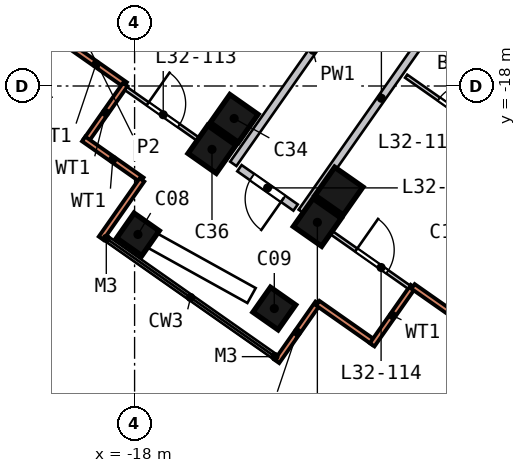
"""IFC4 building model, lengths in metres.
Left out: names, types, materials, properties, quantities, classifications, styles, units other than length and angle.
Written with IfcOpenShell. Run it as: python <this file> out.ifc"""

import sys

from ifc_helpers import new_model, si_unit, direction, frame, frame_2d, origin, origin_2d, place, context, subcontext, project, spatial, rectangle, extrude, element, fill, save


model = new_model("IFC4")
c1 = context("Model", 3, precision=1e-05, world=origin(), true_north=direction((0.0, 1.0)))
c2 = subcontext(c1, "Body", "Model", "MODEL_VIEW")
j1 = project(units=[si_unit("LENGTHUNIT", "METRE"), si_unit("PLANEANGLEUNIT", "RADIAN")], contexts=[c1])
p1 = place(None, origin())
s1 = spatial("IfcSite", under=j1, at=p1, CompositionType="ELEMENT")
p2 = place(p1, origin())
s2 = spatial("IfcBuilding", under=s1, at=p2, CompositionType="ELEMENT")
p3 = place(p2, frame((0.0, 0.0, 136.5)))
s3 = spatial("IfcBuildingStorey", under=s2, at=p3, CompositionType="ELEMENT", Elevation=136.5)
p4 = place(p3, frame((-18.038, -21.804, 0.0), z_axis=(0.104205823, -0.084714632, 0.990941258), x_axis=(0.812221673, -0.567761849, -0.133949377)))
e1 = element("IfcColumn", 1, at=p4, inside=s3, PredefinedType="COLUMN", context=c2, shape_type="SweptSolid", body=[
    extrude(rectangle(XDim=0.8, YDim=0.8, at=origin_2d()), origin(), (0.0, 0.0, 1.0), 3.219),
])
p5 = place(p3, frame((-14.461, -23.775, 0.0), z_axis=(0.113416824, -0.067670774, 0.991240279), x_axis=(0.810958398, -0.570087188, -0.131708295)))
e2 = element("IfcColumn", 2, at=p5, inside=s3, PredefinedType="COLUMN", context=c2, shape_type="SweptSolid", body=[
    extrude(rectangle(XDim=0.8, YDim=0.8, at=origin_2d()), origin(), (0.0, 0.0, 1.0), 3.218),
])
for number, where, z_axis, x_axis in (
    (3, (-15.489, -18.767, 0.0), (0.09, -0.073, 0.993), (-0.575, -0.818, -0.008)),
    (4, (-12.741, -20.694, 0.0), (0.099, -0.06, 0.993), (-0.573, -0.819, 0.008)),
):
    element("IfcColumn", number, at=place(p3, frame(where, z_axis=z_axis, x_axis=x_axis)), inside=s3, PredefinedType="COLUMN", context=c2, shape_type="SweptSolid", body=[
        extrude(rectangle(XDim=0.9, YDim=0.9, at=origin_2d()), origin(), (0.0, 0.0, 1.0), 3.211),
    ])
p6 = place(p3, frame((-16.077, -19.576, 0.0), z_axis=(0.09368082, -0.075598067, 0.992727977), x_axis=(-0.574764351, -0.818279134, -0.008074644)))
e5 = element("IfcColumn", 5, at=p6, inside=s3, PredefinedType="COLUMN", context=c2, shape_type="SweptSolid", body=[
    extrude(rectangle(XDim=0.9, YDim=0.9, at=origin_2d()), origin(), (0.0, 0.0, 1.0), 3.213),
])
p7 = place(p3, frame((-13.315, -21.513, 0.0), z_axis=(0.102724191, -0.062455093, 0.99274725), x_axis=(-0.573707052, -0.819023064, 0.007838281)))
e6 = element("IfcColumn", 6, at=p7, inside=s3, PredefinedType="COLUMN", context=c2, shape_type="SweptSolid", body=[
    extrude(rectangle(XDim=0.9, YDim=0.9, at=origin_2d()), origin(), (0.0, 0.0, 1.0), 3.213),
])
p8 = place(p3, frame((-19.781, -16.887, 0.0), z_axis=(0.0, 0.0, 1.0), x_axis=(0.818778979, -0.574108861, 0.0)))
e7 = element("IfcWall", 7, at=p8, inside=s3, PredefinedType="SOLIDWALL", context=c2, shape_type="SweptSolid", body=[
    extrude(rectangle(XDim=1.875, YDim=0.15, at=frame_2d((0.938, 0.0))), origin(), (0.0, 0.0, 1.0), 3.19),
])
p9 = place(p3, frame((-18.246, -17.963, 0.0), z_axis=(0.0, 0.0, 1.0), x_axis=(-0.574108441, -0.818779273, 0.0)))
e8 = element("IfcWall", 8, at=p9, inside=s3, PredefinedType="SOLIDWALL", context=c2, shape_type="SweptSolid", body=[
    extrude(rectangle(XDim=1.8, YDim=0.15, at=frame_2d((0.9, 0.0))), origin(), (0.0, 0.0, 1.0), 3.19),
])
for number, where, z_axis, x_axis in (
    (9, (-19.341, -19.394, 0.0), (0.0, 0.0, 1.0), (0.819, -0.574, 0.0)),
    (10, (-17.805, -20.471, 0.0), (0.0, 0.0, 1.0), (-0.574, -0.819, 0.0)),
    (11, (-14.256, -25.25, 0.0), (0.0, 0.0, 1.0), (0.574, 0.819, 0.0)),
):
    element("IfcWall", number, at=place(p3, frame(where, z_axis=z_axis, x_axis=x_axis)), inside=s3, PredefinedType="SOLIDWALL", context=c2, shape_type="SweptSolid", body=[
        extrude(rectangle(XDim=1.875, YDim=0.15, at=frame_2d((0.938, 0.0))), origin(), (0.0, 0.0, 1.0), 3.19),
    ])
p10 = place(p3, frame((-13.179, -23.715, 0.0), z_axis=(0.0, 0.0, 1.0), x_axis=(0.818734563, -0.574172201, 0.0)))
e12 = element("IfcWall", 12, at=p10, inside=s3, PredefinedType="SOLIDWALL", context=c2, shape_type="SweptSolid", body=[
    extrude(rectangle(XDim=1.8, YDim=0.15, at=frame_2d((0.9, 0.0))), origin(), (0.0, 0.0, 1.0), 3.19),
])
for number, where, z_axis, x_axis in (
    (13, (-11.749, -24.81, 0.0), (0.0, 0.0, 1.0), (0.574, 0.819, 0.0)),
    (14, (-10.672, -23.274, 0.0), (0.0, 0.0, 1.0), (0.819, -0.574, 0.0)),
):
    element("IfcWall", number, at=place(p3, frame(where, z_axis=z_axis, x_axis=x_axis)), inside=s3, PredefinedType="SOLIDWALL", context=c2, shape_type="SweptSolid", body=[
        extrude(rectangle(XDim=1.875, YDim=0.15, at=frame_2d((0.938, 0.0))), origin(), (0.0, 0.0, 1.0), 3.19),
    ])
p11 = place(p3, frame((-21.803, -17.042, 0.0), z_axis=(0.0, 0.0, 1.0), x_axis=(0.906596382, 0.421998815, 0.0)))
e15 = element("IfcWall", 15, at=p11, inside=s3, PredefinedType="SOLIDWALL", context=c2, shape_type="SweptSolid", body=[
    extrude(rectangle(XDim=2.699, YDim=0.5, at=frame_2d((1.35, 0.0))), origin(), (0.0, 0.0, 1.0), 0.7),
])
p12 = place(p3, frame((-13.763, -21.198, 0.0), z_axis=(0.0, 0.0, 1.0), x_axis=(-0.81872299, 0.574188702, 0.0)))
e16 = element("IfcWall", 16, at=p12, inside=s3, PredefinedType="SOLIDWALL", context=c2, shape_type="SweptSolid", body=[
    extrude(rectangle(XDim=1.804, YDim=0.2, at=frame_2d((0.902, 0.0))), origin(), (0.0, 0.0, 1.0), 3.19),
])
p13 = place(p12, frame((0.4, 0.0, 0.0)))
e17 = element("IfcOpeningElement", 17, at=p13, cuts=e16, PredefinedType="OPENING", context=c2, shape_type="SweptSolid", body=[
    extrude(rectangle(XDim=1.0, YDim=2.1, at=frame_2d((0.5, 1.05))), frame((0.0, 0.11, 0.0), z_axis=(0.0, -1.0, 0.0), x_axis=(1.0, 0.0, 0.0)), (0.0, 0.0, 1.0), 0.22),
])
p14 = place(p3, frame((-11.211, -14.072, 0.0), z_axis=(0.0, 0.0, 1.0), x_axis=(-0.57414226, -0.818755559, 0.0)))
e18 = element("IfcWall", 18, at=p14, inside=s3, PredefinedType="SOLIDWALL", context=c2, shape_type="SweptSolid", body=[
    extrude(rectangle(XDim=7.3, YDim=0.2, at=frame_2d((3.65, 0.0))), origin(), (0.0, 0.0, 1.0), 3.19),
])
p15 = place(p3, frame((-13.601, -21.312, 0.0), z_axis=(0.0, 0.0, 1.0), x_axis=(0.574126539, 0.818766583, 0.0)))
e19 = element("IfcWall", 19, at=p15, inside=s3, PredefinedType="SOLIDWALL", context=c2, shape_type="SweptSolid", body=[
    extrude(rectangle(XDim=7.3, YDim=0.2, at=frame_2d((3.65, 0.0))), origin(), (0.0, 0.0, 1.0), 3.19),
])
p16 = place(p3, frame((-18.229, -18.067, 0.0), z_axis=(0.0, 0.0, 1.0), x_axis=(0.818780202, -0.574107116, 0.0)))
e20 = element("IfcWall", 20, at=p16, inside=s3, PredefinedType="PARTITIONING", context=c2, shape_type="SweptSolid", body=[
    extrude(rectangle(XDim=3.252, YDim=0.1, at=frame_2d((1.626, 0.0))), origin(), (0.0, 0.0, 1.0), 3.19),
])
p17 = place(p16, frame((0.7, 0.0, 0.0)))
e21 = element("IfcOpeningElement", 21, at=p17, cuts=e20, PredefinedType="OPENING", context=c2, shape_type="SweptSolid", body=[
    extrude(rectangle(XDim=1.0, YDim=2.1, at=frame_2d((0.5, 1.05))), frame((0.0, 0.06, 0.0), z_axis=(0.0, -1.0, 0.0), x_axis=(1.0, 0.0, 0.0)), (0.0, 0.0, 1.0), 0.12),
])
p18 = place(p3, frame((-13.438, -21.427, 0.0), z_axis=(0.0, 0.0, 1.0), x_axis=(0.818755455, -0.574142408, 0.0)))
e22 = element("IfcWall", 22, at=p18, inside=s3, PredefinedType="PARTITIONING", context=c2, shape_type="SweptSolid", body=[
    extrude(rectangle(XDim=3.252, YDim=0.1, at=frame_2d((1.626, 0.0))), origin(), (0.0, 0.0, 1.0), 3.19),
])
p19 = place(p18, frame((1.55, 0.0, 0.0)))
e23 = element("IfcOpeningElement", 23, at=p19, cuts=e22, PredefinedType="OPENING", context=c2, shape_type="SweptSolid", body=[
    extrude(rectangle(XDim=1.0, YDim=2.1, at=frame_2d((0.5, 1.05))), frame((0.0, 0.06, 0.0), z_axis=(0.0, -1.0, 0.0), x_axis=(1.0, 0.0, 0.0)), (0.0, 0.0, 1.0), 0.12),
])
p20 = place(p3, frame((-10.854, -17.742, 0.0), z_axis=(0.0, 0.0, 1.0), x_axis=(0.818744188, -0.574158475, 0.0)))
e24 = element("IfcWall", 24, at=p20, inside=s3, PredefinedType="PARTITIONING", context=c2, shape_type="SweptSolid", body=[
    extrude(rectangle(XDim=3.2, YDim=0.1, at=frame_2d((1.6, 0.0))), origin(), (0.0, 0.0, 1.0), 3.19),
])
p21 = place(p20, frame((1.05, 0.0, 0.0)))
e25 = element("IfcOpeningElement", 25, at=p21, cuts=e24, PredefinedType="OPENING", context=c2, shape_type="SweptSolid", body=[
    extrude(rectangle(XDim=0.9, YDim=2.1, at=frame_2d((0.45, 1.05))), frame((0.0, 0.06, 0.0), z_axis=(0.0, -1.0, 0.0), x_axis=(1.0, 0.0, 0.0)), (0.0, 0.0, 1.0), 0.12),
])
p22 = place(p13, origin())
e26 = element("IfcDoor", 26, at=p22, inside=s3, OperationType="SINGLE_SWING_LEFT", PredefinedType="DOOR", context=c2, shape_type="SweptSolid", body=[
    extrude(rectangle(XDim=1.0, YDim=2.1, at=frame_2d((0.5, 1.05))), frame((0.0, 0.025, 0.0), z_axis=(0.0, -1.0, 0.0), x_axis=(1.0, 0.0, 0.0)), (0.0, 0.0, 1.0), 0.05),
])
fill(e17, e26)
p23 = place(p17, origin())
e27 = element("IfcDoor", 27, at=p23, inside=s3, OperationType="SINGLE_SWING_LEFT", PredefinedType="DOOR", context=c2, shape_type="SweptSolid", body=[
    extrude(rectangle(XDim=1.0, YDim=2.1, at=frame_2d((0.5, 1.05))), frame((0.0, 0.025, 0.0), z_axis=(0.0, -1.0, 0.0), x_axis=(1.0, 0.0, 0.0)), (0.0, 0.0, 1.0), 0.05),
])
fill(e21, e27)
p24 = place(p19, origin())
e28 = element("IfcDoor", 28, at=p24, inside=s3, OperationType="SINGLE_SWING_LEFT", PredefinedType="DOOR", context=c2, shape_type="SweptSolid", body=[
    extrude(rectangle(XDim=1.0, YDim=2.1, at=frame_2d((0.5, 1.05))), frame((0.0, 0.025, 0.0), z_axis=(0.0, -1.0, 0.0), x_axis=(1.0, 0.0, 0.0)), (0.0, 0.0, 1.0), 0.05),
])
fill(e23, e28)
p25 = place(p21, origin())
e29 = element("IfcDoor", 29, at=p25, inside=s3, OperationType="SINGLE_SWING_RIGHT", PredefinedType="DOOR", context=c2, shape_type="SweptSolid", body=[
    extrude(rectangle(XDim=0.9, YDim=2.1, at=frame_2d((0.45, 1.05))), frame((0.0, 0.025, 0.0), z_axis=(0.0, -1.0, 0.0), x_axis=(1.0, 0.0, 0.0)), (0.0, 0.0, 1.0), 0.05),
])
fill(e25, e29)
save(model, sys.argv[1])
